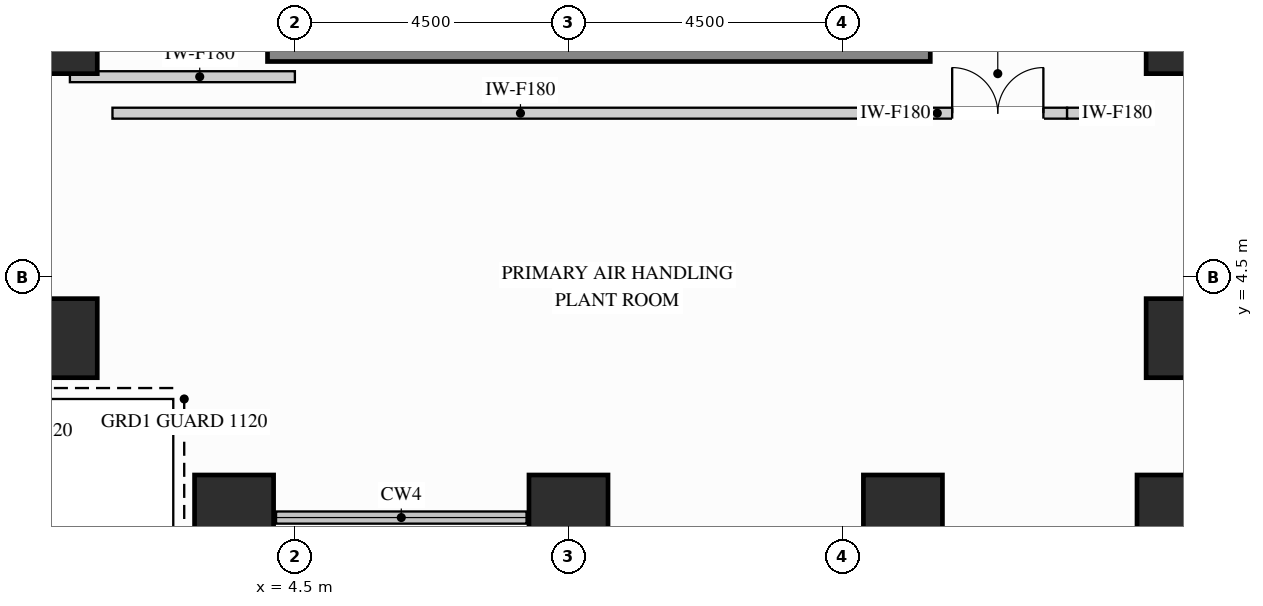
"""IFC4 building model, lengths in metres.
Left out: names, types, materials, properties, quantities, classifications, styles, units other than length and angle.
Written with IfcOpenShell. Run it as: python <this file> out.ifc"""

import sys

from ifc_helpers import new_model, si_unit, direction, frame, frame_2d, origin, origin_2d, place, context, subcontext, project, spatial, rectangle, extrude, source, transform, mapped, element, fill, save


model = new_model("IFC4")
c1 = context("Model", 3, precision=1e-05, world=origin(), true_north=direction((0.0, 1.0)))
c2 = subcontext(c1, "Body", "Model", "MODEL_VIEW")
j1 = project(units=[si_unit("LENGTHUNIT", "METRE"), si_unit("PLANEANGLEUNIT", "RADIAN")], contexts=[c1])
p1 = place(None, origin())
s1 = spatial("IfcSite", under=j1, at=p1, CompositionType="ELEMENT")
p2 = place(p1, origin())
s2 = spatial("IfcBuilding", under=s1, at=p2, CompositionType="ELEMENT")
p3 = place(p2, frame((0.0, 0.0, 72.9)))
s3 = spatial("IfcBuildingStorey", under=s2, at=p3, CompositionType="ELEMENT", Elevation=72.9)
m1 = source(origin(), c2, "Body", "SweptSolid", [
    extrude(rectangle(XDim=1.0, YDim=1.3, at=origin_2d()), origin(), (0.0, 0.0, 1.0), 4.26),
])
for number, where, z_axis, x_axis in (
    (1, (19.0, 3.5, 0.0), (0.0, 0.0, 1.0), (1.0, 0.0, 0.0)),
    (2, (19.0, 8.5, 0.0), (0.0, 0.0, 1.0), (1.0, 0.0, 0.0)),
):
    element("IfcColumn", number, at=place(p3, frame(where, z_axis=z_axis, x_axis=x_axis)), inside=s3, PredefinedType="COLUMN", context=c2, shape_type="MappedRepresentation", body=[
        mapped(m1, transform((0.0, 0.0, 0.0), x_axis=(1.0, 0.0, 0.0), y_axis=(0.0, 1.0, 0.0), z_axis=(0.0, 0.0, 1.0))),
    ])
m2 = source(origin(), c2, "Body", "SweptSolid", [
    extrude(rectangle(XDim=1.3, YDim=1.3, at=origin_2d()), origin(), (0.0, 0.0, 1.0), 4.26),
])
for number, where, z_axis, x_axis in (
    (3, (14.5, 0.6, 0.0), (0.0, 0.0, 1.0), (1.0, 0.0, 0.0)),
    (4, (19.0, 0.6, 0.0), (0.0, 0.0, 1.0), (1.0, 0.0, 0.0)),
    (5, (3.5, 0.6, 0.0), (0.0, 0.0, 1.0), (1.0, 0.0, 0.0)),
    (6, (9.0, 0.6, 0.0), (0.0, 0.0, 1.0), (1.0, 0.0, 0.0)),
    (7, (0.6, 3.5, 0.0), (0.0, 0.0, 1.0), (1.0, 0.0, 0.0)),
    (8, (0.6, 8.5, 0.0), (0.0, 0.0, 1.0), (1.0, 0.0, 0.0)),
):
    element("IfcColumn", number, at=place(p3, frame(where, z_axis=z_axis, x_axis=x_axis)), inside=s3, PredefinedType="COLUMN", context=c2, shape_type="MappedRepresentation", body=[
        mapped(m2, transform((0.0, 0.0, 0.0), x_axis=(1.0, 0.0, 0.0), y_axis=(0.0, 1.0, 0.0), z_axis=(0.0, 0.0, 1.0))),
    ])
m3 = source(origin(), c2, "Body", "SweptSolid", [
    extrude(rectangle(XDim=10.9, YDim=0.9, at=frame_2d((5.45, 0.0))), origin(), (0.0, 0.0, 1.0), 4.26),
])
p4 = place(p3, frame((4.05, 8.5, 0.0), z_axis=(0.0, 0.0, 1.0), x_axis=(1.0, 0.0, 0.0)))
e9 = element("IfcWall", 9, at=p4, inside=s3, PredefinedType="SHEAR", context=c2, shape_type="MappedRepresentation", body=[
    mapped(m3, transform((0.0, 0.0, 0.0), x_axis=(1.0, 0.0, 0.0), y_axis=(0.0, 1.0, 0.0), z_axis=(0.0, 0.0, 1.0))),
])
p5 = place(p3, frame((14.92, 7.2, 0.0), z_axis=(0.0, 0.0, 1.0), x_axis=(1.0, 0.0, 0.0)))
e10 = element("IfcWall", 10, at=p5, inside=s3, PredefinedType="PARTITIONING", context=c2, shape_type="SweptSolid", body=[
    extrude(rectangle(XDim=2.28, YDim=0.18, at=frame_2d((1.14, 0.0))), origin(), (0.0, 0.0, 1.0), 4.245),
])
p6 = place(p5, frame((0.39, 0.0, 0.0)))
e11 = element("IfcOpeningElement", 11, at=p6, cuts=e10, PredefinedType="OPENING", context=c2, shape_type="SweptSolid", body=[
    extrude(rectangle(XDim=1.5, YDim=2.2, at=frame_2d((0.75, 1.1))), frame((0.0, 0.1, 0.0), z_axis=(0.0, -1.0, 0.0), x_axis=(1.0, 0.0, 0.0)), (0.0, 0.0, 1.0), 0.2),
])
m4 = source(origin(), c2, "Body", "SweptSolid", [
    extrude(rectangle(XDim=13.42, YDim=0.18, at=frame_2d((6.71, 0.0))), origin(), (0.0, 0.0, 1.0), 4.245),
])
p7 = place(p3, frame((1.5, 7.2, 0.0), z_axis=(0.0, 0.0, 1.0), x_axis=(1.0, 0.0, 0.0)))
e12 = element("IfcWall", 12, at=p7, inside=s3, PredefinedType="PARTITIONING", context=c2, shape_type="MappedRepresentation", body=[
    mapped(m4, transform((0.0, 0.0, 0.0), x_axis=(1.0, 0.0, 0.0), y_axis=(0.0, 1.0, 0.0), z_axis=(0.0, 0.0, 1.0))),
])
m5 = source(origin(), c2, "Body", "SweptSolid", [
    extrude(rectangle(XDim=0.9, YDim=0.18, at=frame_2d((0.45, 0.0))), origin(), (0.0, 0.0, 1.0), 4.245),
])
p8 = place(p3, frame((17.2, 7.2, 0.0), z_axis=(0.0, 0.0, 1.0), x_axis=(1.0, 0.0, 0.0)))
e13 = element("IfcWall", 13, at=p8, inside=s3, PredefinedType="PARTITIONING", context=c2, shape_type="MappedRepresentation", body=[
    mapped(m5, transform((0.0, 0.0, 0.0), x_axis=(1.0, 0.0, 0.0), y_axis=(0.0, 1.0, 0.0), z_axis=(0.0, 0.0, 1.0))),
])
m6 = source(origin(), c2, "Body", "SweptSolid", [
    extrude(rectangle(XDim=3.7, YDim=0.18, at=frame_2d((1.85, 0.0))), origin(), (0.0, 0.0, 1.0), 3.708),
])
p9 = place(p3, frame((0.8, 7.8, 0.0), z_axis=(0.0, 0.0, 1.0), x_axis=(1.0, 0.0, 0.0)))
e14 = element("IfcWall", 14, at=p9, inside=s3, PredefinedType="PARTITIONING", context=c2, shape_type="MappedRepresentation", body=[
    mapped(m6, transform((0.0, 0.0, 0.0), x_axis=(1.0, 0.0, 0.0), y_axis=(0.0, 1.0, 0.0), z_axis=(0.0, 0.0, 1.0))),
])
m7 = source(origin(), c2, "Body", "SweptSolid", [
    extrude(rectangle(XDim=1.5, YDim=2.2, at=frame_2d((0.75, 1.1))), frame((0.0, 0.025, 0.0), z_axis=(0.0, -1.0, 0.0), x_axis=(1.0, 0.0, 0.0)), (0.0, 0.0, 1.0), 0.05),
])
p10 = place(p6, origin())
e15 = element("IfcDoor", 15, at=p10, inside=s3, OperationType="DOUBLE_DOOR_SINGLE_SWING", PredefinedType="DOOR", context=c2, shape_type="MappedRepresentation", body=[
    mapped(m7, transform((0.0, 0.0, 0.0), x_axis=(1.0, 0.0, 0.0), y_axis=(0.0, 1.0, 0.0), z_axis=(0.0, 0.0, 1.0))),
])
fill(e11, e15)
save(model, sys.argv[1])
